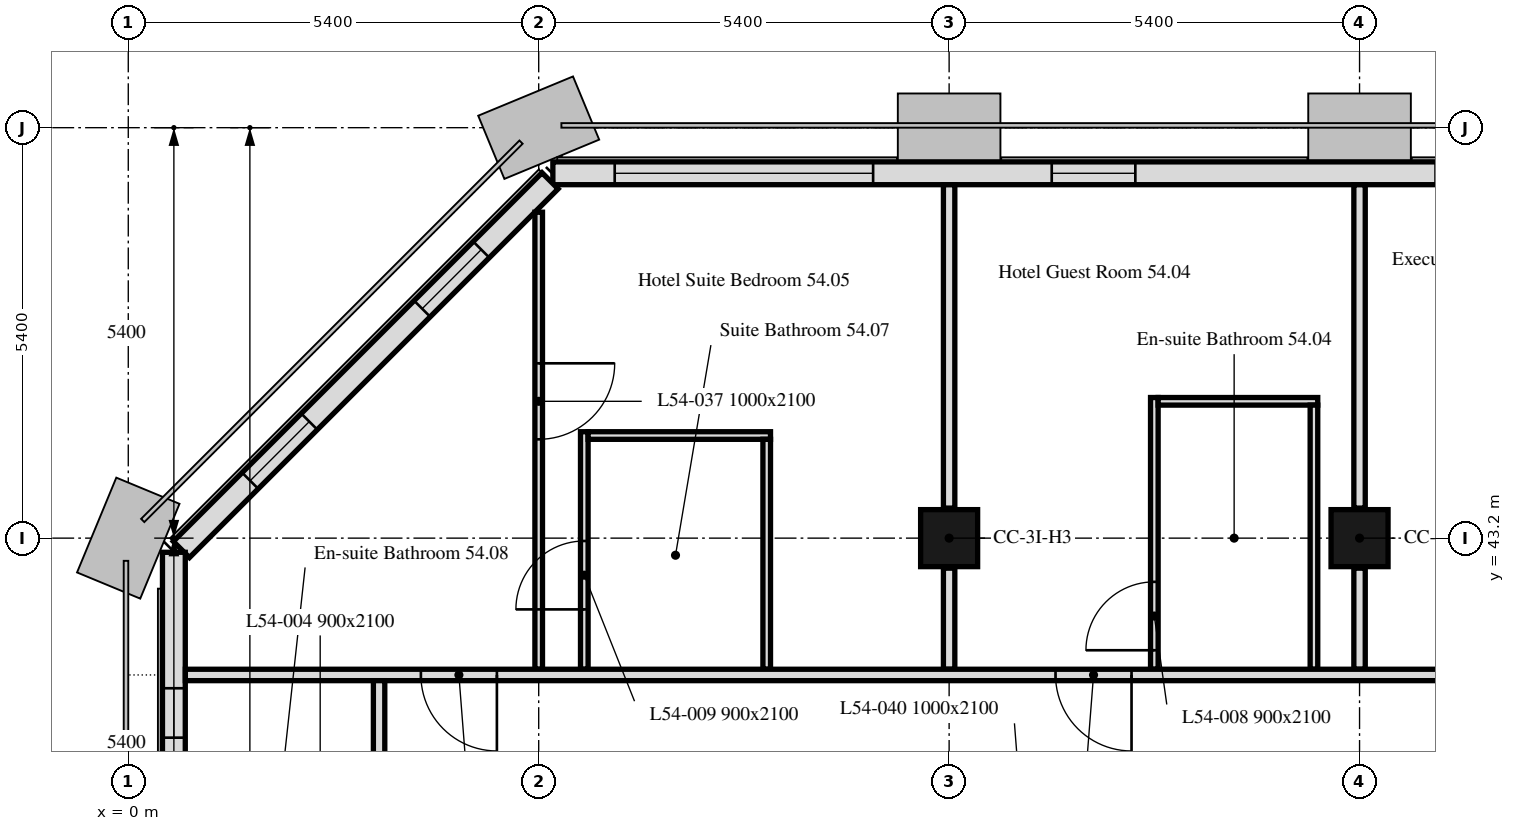
"""IFC4 building model, lengths in metres.
Left out: names, types, materials, properties, quantities, classifications, styles, units other than length and angle.
Written with IfcOpenShell. Run it as: python <this file> out.ifc"""

import sys

from ifc_helpers import new_model, si_unit, direction, frame, frame_2d, origin, origin_2d, place, context, subcontext, project, spatial, rectangle, extrude, element, fill, save


model = new_model("IFC4")
c1 = context("Model", 3, precision=1e-05, world=origin(), true_north=direction((0.0, 1.0)))
c2 = subcontext(c1, "Body", "Model", "MODEL_VIEW")
j1 = project(units=[si_unit("LENGTHUNIT", "METRE"), si_unit("PLANEANGLEUNIT", "RADIAN")], contexts=[c1])
p1 = place(None, origin())
s1 = spatial("IfcSite", under=j1, at=p1, CompositionType="ELEMENT")
p2 = place(p1, origin())
s2 = spatial("IfcBuilding", under=s1, at=p2, CompositionType="ELEMENT")
p3 = place(p2, frame((0.0, 0.0, 217.0)))
s3 = spatial("IfcBuildingStorey", under=s2, at=p3, CompositionType="ELEMENT", Elevation=217.0)
for number, where, z_axis, x_axis in (
    (1, (10.8, 43.2, 0.0), (0.0, 0.0, 1.0), (1.0, 0.0, 0.0)),
    (2, (16.2, 43.2, 0.0), (0.0, 0.0, 1.0), (1.0, 0.0, 0.0)),
):
    element("IfcColumn", number, at=place(p3, frame(where, z_axis=z_axis, x_axis=x_axis)), inside=s3, PredefinedType="COLUMN", context=c2, shape_type="SweptSolid", body=[
        extrude(rectangle(XDim=0.75, YDim=0.75, at=origin_2d()), origin(), (0.0, 0.0, 1.0), 3.0),
    ])
p4 = place(p3, frame((37.614, 48.0, 0.0), z_axis=(0.0, 0.0, 1.0), x_axis=(-1.0, 0.0, 0.0)))
e3 = element("IfcWall", 3, at=p4, inside=s3, PredefinedType="SOLIDWALL", context=c2, shape_type="SweptSolid", body=[
    extrude(rectangle(XDim=32.027, YDim=0.3, at=frame_2d((16.014, 0.0))), origin(), (0.0, 0.0, 1.0), 3.0),
])
p5 = place(p4, frame((2.764, 0.0, 0.9)))
e4 = element("IfcOpeningElement", 4, at=p5, cuts=e3, PredefinedType="OPENING", context=c2, shape_type="SweptSolid", body=[
    extrude(rectangle(XDim=1.1, YDim=1.7, at=frame_2d((0.55, 0.85))), frame((0.0, 0.16, 0.0), z_axis=(0.0, -1.0, 0.0), x_axis=(1.0, 0.0, 0.0)), (0.0, 0.0, 1.0), 0.32),
])
p6 = place(p4, frame((6.214, 0.0, 0.9)))
e5 = element("IfcOpeningElement", 5, at=p6, cuts=e3, PredefinedType="OPENING", context=c2, shape_type="SweptSolid", body=[
    extrude(rectangle(XDim=3.4, YDim=1.7, at=frame_2d((1.7, 0.85))), frame((0.0, 0.16, 0.0), z_axis=(0.0, -1.0, 0.0), x_axis=(1.0, 0.0, 0.0)), (0.0, 0.0, 1.0), 0.32),
])
p7 = place(p4, frame((13.564, 0.0, 0.9)))
e6 = element("IfcOpeningElement", 6, at=p7, cuts=e3, PredefinedType="OPENING", context=c2, shape_type="SweptSolid", body=[
    extrude(rectangle(XDim=1.1, YDim=1.7, at=frame_2d((0.55, 0.85))), frame((0.0, 0.16, 0.0), z_axis=(0.0, -1.0, 0.0), x_axis=(1.0, 0.0, 0.0)), (0.0, 0.0, 1.0), 0.32),
])
p8 = place(p4, frame((17.014, 0.0, 0.9)))
e7 = element("IfcOpeningElement", 7, at=p8, cuts=e3, PredefinedType="OPENING", context=c2, shape_type="SweptSolid", body=[
    extrude(rectangle(XDim=3.4, YDim=1.7, at=frame_2d((1.7, 0.85))), frame((0.0, 0.16, 0.0), z_axis=(0.0, -1.0, 0.0), x_axis=(1.0, 0.0, 0.0)), (0.0, 0.0, 1.0), 0.32),
])
p9 = place(p4, frame((24.364, 0.0, 0.9)))
e8 = element("IfcOpeningElement", 8, at=p9, cuts=e3, PredefinedType="OPENING", context=c2, shape_type="SweptSolid", body=[
    extrude(rectangle(XDim=1.1, YDim=1.7, at=frame_2d((0.55, 0.85))), frame((0.0, 0.16, 0.0), z_axis=(0.0, -1.0, 0.0), x_axis=(1.0, 0.0, 0.0)), (0.0, 0.0, 1.0), 0.32),
])
p10 = place(p4, frame((27.814, 0.0, 0.9)))
e9 = element("IfcOpeningElement", 9, at=p10, cuts=e3, PredefinedType="OPENING", context=c2, shape_type="SweptSolid", body=[
    extrude(rectangle(XDim=3.4, YDim=1.7, at=frame_2d((1.7, 0.85))), frame((0.0, 0.16, 0.0), z_axis=(0.0, -1.0, 0.0), x_axis=(1.0, 0.0, 0.0)), (0.0, 0.0, 1.0), 0.32),
])
p11 = place(p3, frame((5.55, 47.901, 0.0), z_axis=(0.0, 0.0, 1.0), x_axis=(-0.707106781187, -0.707106781187, 0.0)))
e10 = element("IfcWall", 10, at=p11, inside=s3, PredefinedType="SOLIDWALL", context=c2, shape_type="SweptSolid", body=[
    extrude(rectangle(XDim=6.86, YDim=0.3, at=frame_2d((3.43, 0.0))), origin(), (0.0, 0.0, 1.0), 3.0),
])
p12 = place(p11, frame((1.28, 0.0, 0.9)))
e11 = element("IfcOpeningElement", 11, at=p12, cuts=e10, PredefinedType="OPENING", context=c2, shape_type="SweptSolid", body=[
    extrude(rectangle(XDim=1.1, YDim=1.7, at=frame_2d((0.55, 0.85))), frame((0.0, 0.16, 0.0), z_axis=(0.0, -1.0, 0.0), x_axis=(1.0, 0.0, 0.0)), (0.0, 0.0, 1.0), 0.32),
])
p13 = place(p11, frame((4.48, 0.0, 0.9)))
e12 = element("IfcOpeningElement", 12, at=p13, cuts=e10, PredefinedType="OPENING", context=c2, shape_type="SweptSolid", body=[
    extrude(rectangle(XDim=1.1, YDim=1.7, at=frame_2d((0.55, 0.85))), frame((0.0, 0.16, 0.0), z_axis=(0.0, -1.0, 0.0), x_axis=(1.0, 0.0, 0.0)), (0.0, 0.0, 1.0), 0.32),
])
p14 = place(p3, frame((0.6, 43.014, 0.0), z_axis=(0.0, 0.0, 1.0), x_axis=(0.0, -1.0, 0.0)))
e13 = element("IfcWall", 13, at=p14, inside=s3, PredefinedType="SOLIDWALL", context=c2, shape_type="SweptSolid", body=[
    extrude(rectangle(XDim=32.027, YDim=0.3, at=frame_2d((16.014, 0.0))), origin(), (0.0, 0.0, 1.0), 3.0),
])
p15 = place(p14, frame((1.789, 0.0, 0.9)))
e14 = element("IfcOpeningElement", 14, at=p15, cuts=e13, PredefinedType="OPENING", context=c2, shape_type="SweptSolid", body=[
    extrude(rectangle(XDim=0.65, YDim=1.7, at=frame_2d((0.325, 0.85))), frame((0.0, 0.16, 0.0), z_axis=(0.0, -1.0, 0.0), x_axis=(1.0, 0.0, 0.0)), (0.0, 0.0, 1.0), 0.32),
])
p16 = place(p14, frame((2.764, 0.0, 0.9)))
e15 = element("IfcOpeningElement", 15, at=p16, cuts=e13, PredefinedType="OPENING", context=c2, shape_type="SweptSolid", body=[
    extrude(rectangle(XDim=1.1, YDim=1.7, at=frame_2d((0.55, 0.85))), frame((0.0, 0.16, 0.0), z_axis=(0.0, -1.0, 0.0), x_axis=(1.0, 0.0, 0.0)), (0.0, 0.0, 1.0), 0.32),
])
p17 = place(p14, frame((6.214, 0.0, 0.9)))
e16 = element("IfcOpeningElement", 16, at=p17, cuts=e13, PredefinedType="OPENING", context=c2, shape_type="SweptSolid", body=[
    extrude(rectangle(XDim=3.4, YDim=1.7, at=frame_2d((1.7, 0.85))), frame((0.0, 0.16, 0.0), z_axis=(0.0, -1.0, 0.0), x_axis=(1.0, 0.0, 0.0)), (0.0, 0.0, 1.0), 0.32),
])
p18 = place(p14, frame((11.964, 0.0, 0.9)))
e17 = element("IfcOpeningElement", 17, at=p18, cuts=e13, PredefinedType="OPENING", context=c2, shape_type="SweptSolid", body=[
    extrude(rectangle(XDim=1.1, YDim=1.7, at=frame_2d((0.55, 0.85))), frame((0.0, 0.16, 0.0), z_axis=(0.0, -1.0, 0.0), x_axis=(1.0, 0.0, 0.0)), (0.0, 0.0, 1.0), 0.32),
])
p19 = place(p14, frame((13.564, 0.0, 0.9)))
e18 = element("IfcOpeningElement", 18, at=p19, cuts=e13, PredefinedType="OPENING", context=c2, shape_type="SweptSolid", body=[
    extrude(rectangle(XDim=1.1, YDim=1.7, at=frame_2d((0.55, 0.85))), frame((0.0, 0.16, 0.0), z_axis=(0.0, -1.0, 0.0), x_axis=(1.0, 0.0, 0.0)), (0.0, 0.0, 1.0), 0.32),
])
p20 = place(p14, frame((17.364, 0.0, 0.9)))
e19 = element("IfcOpeningElement", 19, at=p20, cuts=e13, PredefinedType="OPENING", context=c2, shape_type="SweptSolid", body=[
    extrude(rectangle(XDim=1.1, YDim=1.7, at=frame_2d((0.55, 0.85))), frame((0.0, 0.16, 0.0), z_axis=(0.0, -1.0, 0.0), x_axis=(1.0, 0.0, 0.0)), (0.0, 0.0, 1.0), 0.32),
])
p21 = place(p14, frame((18.964, 0.0, 0.9)))
e20 = element("IfcOpeningElement", 20, at=p21, cuts=e13, PredefinedType="OPENING", context=c2, shape_type="SweptSolid", body=[
    extrude(rectangle(XDim=1.1, YDim=1.7, at=frame_2d((0.55, 0.85))), frame((0.0, 0.16, 0.0), z_axis=(0.0, -1.0, 0.0), x_axis=(1.0, 0.0, 0.0)), (0.0, 0.0, 1.0), 0.32),
])
p22 = place(p14, frame((22.764, 0.0, 0.9)))
e21 = element("IfcOpeningElement", 21, at=p22, cuts=e13, PredefinedType="OPENING", context=c2, shape_type="SweptSolid", body=[
    extrude(rectangle(XDim=1.1, YDim=1.7, at=frame_2d((0.55, 0.85))), frame((0.0, 0.16, 0.0), z_axis=(0.0, -1.0, 0.0), x_axis=(1.0, 0.0, 0.0)), (0.0, 0.0, 1.0), 0.32),
])
p23 = place(p14, frame((24.364, 0.0, 0.9)))
e22 = element("IfcOpeningElement", 22, at=p23, cuts=e13, PredefinedType="OPENING", context=c2, shape_type="SweptSolid", body=[
    extrude(rectangle(XDim=1.1, YDim=1.7, at=frame_2d((0.55, 0.85))), frame((0.0, 0.16, 0.0), z_axis=(0.0, -1.0, 0.0), x_axis=(1.0, 0.0, 0.0)), (0.0, 0.0, 1.0), 0.32),
])
p24 = place(p14, frame((27.814, 0.0, 0.9)))
e23 = element("IfcOpeningElement", 23, at=p24, cuts=e13, PredefinedType="OPENING", context=c2, shape_type="SweptSolid", body=[
    extrude(rectangle(XDim=3.4, YDim=1.7, at=frame_2d((1.7, 0.85))), frame((0.0, 0.16, 0.0), z_axis=(0.0, -1.0, 0.0), x_axis=(1.0, 0.0, 0.0)), (0.0, 0.0, 1.0), 0.32),
])
p25 = place(p3, frame((16.2, 47.849, 0.0), z_axis=(0.0, 0.0, 1.0), x_axis=(0.0, -1.0, 0.0)))
e24 = element("IfcWall", 24, at=p25, inside=s3, PredefinedType="PARTITIONING", context=c2, shape_type="SweptSolid", body=[
    extrude(rectangle(XDim=4.254, YDim=0.15, at=frame_2d((2.127, 0.0))), origin(), (0.0, 0.0, 1.0), 2.4),
])
p26 = place(p3, frame((16.2, 42.805, 0.0), z_axis=(0.0, 0.0, 1.0), x_axis=(0.0, -1.0, 0.0)))
e25 = element("IfcWall", 25, at=p26, inside=s3, PredefinedType="PARTITIONING", context=c2, shape_type="SweptSolid", body=[
    extrude(rectangle(XDim=1.33, YDim=0.15, at=frame_2d((0.665, 0.0))), origin(), (0.0, 0.0, 1.0), 2.4),
])
p27 = place(p3, frame((10.8, 47.849, 0.0), z_axis=(0.0, 0.0, 1.0), x_axis=(0.0, -1.0, 0.0)))
e26 = element("IfcWall", 26, at=p27, inside=s3, PredefinedType="PARTITIONING", context=c2, shape_type="SweptSolid", body=[
    extrude(rectangle(XDim=4.254, YDim=0.15, at=frame_2d((2.127, 0.0))), origin(), (0.0, 0.0, 1.0), 2.4),
])
p28 = place(p3, frame((10.8, 42.805, 0.0), z_axis=(0.0, 0.0, 1.0), x_axis=(0.0, -1.0, 0.0)))
e27 = element("IfcWall", 27, at=p28, inside=s3, PredefinedType="PARTITIONING", context=c2, shape_type="SweptSolid", body=[
    extrude(rectangle(XDim=1.33, YDim=0.15, at=frame_2d((0.665, 0.0))), origin(), (0.0, 0.0, 1.0), 2.4),
])
p29 = place(p3, frame((13.5, 41.475, 0.0), z_axis=(0.0, 0.0, 1.0), x_axis=(0.0, 1.0, 0.0)))
e28 = element("IfcWall", 28, at=p29, inside=s3, PredefinedType="PARTITIONING", context=c2, shape_type="SweptSolid", body=[
    extrude(rectangle(XDim=3.575, YDim=0.1, at=frame_2d((1.788, 0.0))), origin(), (0.0, 0.0, 1.0), 3.0),
])
p30 = place(p29, frame((0.25, 0.0, 0.0)))
e29 = element("IfcOpeningElement", 29, at=p30, cuts=e28, PredefinedType="OPENING", context=c2, shape_type="SweptSolid", body=[
    extrude(rectangle(XDim=0.9, YDim=2.1, at=frame_2d((0.45, 1.05))), frame((0.0, 0.05, 0.0), z_axis=(0.0, -1.0, 0.0), x_axis=(1.0, 0.0, 0.0)), (0.0, 0.0, 1.0), 0.1),
])
p31 = place(p3, frame((13.55, 45.0, 0.0), z_axis=(0.0, 0.0, 1.0), x_axis=(1.0, 0.0, 0.0)))
e30 = element("IfcWall", 30, at=p31, inside=s3, PredefinedType="PARTITIONING", context=c2, shape_type="SweptSolid", body=[
    extrude(rectangle(XDim=2.1, YDim=0.1, at=frame_2d((1.05, 0.0))), origin(), (0.0, 0.0, 1.0), 3.0),
])
p32 = place(p3, frame((15.6, 44.95, 0.0), z_axis=(0.0, 0.0, 1.0), x_axis=(0.0, -1.0, 0.0)))
e31 = element("IfcWall", 31, at=p32, inside=s3, PredefinedType="PARTITIONING", context=c2, shape_type="SweptSolid", body=[
    extrude(rectangle(XDim=3.475, YDim=0.1, at=frame_2d((1.737, 0.0))), origin(), (0.0, 0.0, 1.0), 3.0),
])
p33 = place(p3, frame((5.4, 47.488, 0.0), z_axis=(0.0, 0.0, 1.0), x_axis=(0.0, -1.0, 0.0)))
e32 = element("IfcWall", 32, at=p33, inside=s3, PredefinedType="PARTITIONING", context=c2, shape_type="SweptSolid", body=[
    extrude(rectangle(XDim=6.013, YDim=0.1, at=frame_2d((3.006, 0.0))), origin(), (0.0, 0.0, 1.0), 3.0),
])
p34 = place(p33, frame((1.988, 0.0, 0.0)))
e33 = element("IfcOpeningElement", 33, at=p34, cuts=e32, PredefinedType="OPENING", context=c2, shape_type="SweptSolid", body=[
    extrude(rectangle(XDim=1.0, YDim=2.1, at=frame_2d((0.5, 1.05))), frame((0.0, 0.05, 0.0), z_axis=(0.0, -1.0, 0.0), x_axis=(1.0, 0.0, 0.0)), (0.0, 0.0, 1.0), 0.1),
])
p35 = place(p3, frame((6.0, 41.475, 0.0), z_axis=(0.0, 0.0, 1.0), x_axis=(0.0, 1.0, 0.0)))
e34 = element("IfcWall", 34, at=p35, inside=s3, PredefinedType="PARTITIONING", context=c2, shape_type="SweptSolid", body=[
    extrude(rectangle(XDim=3.125, YDim=0.1, at=frame_2d((1.562, 0.0))), origin(), (0.0, 0.0, 1.0), 3.0),
])
p36 = place(p35, frame((0.788, 0.0, 0.0)))
e35 = element("IfcOpeningElement", 35, at=p36, cuts=e34, PredefinedType="OPENING", context=c2, shape_type="SweptSolid", body=[
    extrude(rectangle(XDim=0.9, YDim=2.1, at=frame_2d((0.45, 1.05))), frame((0.0, 0.05, 0.0), z_axis=(0.0, -1.0, 0.0), x_axis=(1.0, 0.0, 0.0)), (0.0, 0.0, 1.0), 0.1),
])
p37 = place(p3, frame((6.05, 44.55, 0.0), z_axis=(0.0, 0.0, 1.0), x_axis=(1.0, 0.0, 0.0)))
e36 = element("IfcWall", 36, at=p37, inside=s3, PredefinedType="PARTITIONING", context=c2, shape_type="SweptSolid", body=[
    extrude(rectangle(XDim=2.4, YDim=0.1, at=frame_2d((1.2, 0.0))), origin(), (0.0, 0.0, 1.0), 3.0),
])
p38 = place(p3, frame((8.4, 44.5, 0.0), z_axis=(0.0, 0.0, 1.0), x_axis=(0.0, -1.0, 0.0)))
e37 = element("IfcWall", 37, at=p38, inside=s3, PredefinedType="PARTITIONING", context=c2, shape_type="SweptSolid", body=[
    extrude(rectangle(XDim=3.025, YDim=0.1, at=frame_2d((1.512, 0.0))), origin(), (0.0, 0.0, 1.0), 3.0),
])
p39 = place(p3, frame((42.449, 41.4, 0.0), z_axis=(0.0, 0.0, 1.0), x_axis=(-1.0, 0.0, 0.0)))
e38 = element("IfcWall", 38, at=p39, inside=s3, PredefinedType="PARTITIONING", context=c2, shape_type="SweptSolid", body=[
    extrude(rectangle(XDim=41.698, YDim=0.15, at=frame_2d((20.849, 0.0))), origin(), (0.0, 0.0, 1.0), 2.4),
])
p40 = place(p39, frame((1.449, 0.0, 0.0)))
e39 = element("IfcOpeningElement", 39, at=p40, cuts=e38, PredefinedType="OPENING", context=c2, shape_type="SweptSolid", body=[
    extrude(rectangle(XDim=1.0, YDim=2.1, at=frame_2d((0.5, 1.05))), frame((0.0, 0.075, 0.0), z_axis=(0.0, -1.0, 0.0), x_axis=(1.0, 0.0, 0.0)), (0.0, 0.0, 1.0), 0.15),
])
p41 = place(p39, frame((29.249, 0.0, 0.0)))
e40 = element("IfcOpeningElement", 40, at=p41, cuts=e38, PredefinedType="OPENING", context=c2, shape_type="SweptSolid", body=[
    extrude(rectangle(XDim=1.0, YDim=2.1, at=frame_2d((0.5, 1.05))), frame((0.0, 0.075, 0.0), z_axis=(0.0, -1.0, 0.0), x_axis=(1.0, 0.0, 0.0)), (0.0, 0.0, 1.0), 0.15),
])
p42 = place(p39, frame((37.599, 0.0, 0.0)))
e41 = element("IfcOpeningElement", 41, at=p42, cuts=e38, PredefinedType="OPENING", context=c2, shape_type="SweptSolid", body=[
    extrude(rectangle(XDim=1.0, YDim=2.1, at=frame_2d((0.5, 1.05))), frame((0.0, 0.075, 0.0), z_axis=(0.0, -1.0, 0.0), x_axis=(1.0, 0.0, 0.0)), (0.0, 0.0, 1.0), 0.15),
])
p43 = place(p39, frame((17.649, 0.0, 0.0)))
e42 = element("IfcOpeningElement", 42, at=p43, cuts=e38, PredefinedType="OPENING", context=c2, shape_type="SweptSolid", body=[
    extrude(rectangle(XDim=1.0, YDim=2.1, at=frame_2d((0.5, 1.05))), frame((0.0, 0.075, 0.0), z_axis=(0.0, -1.0, 0.0), x_axis=(1.0, 0.0, 0.0)), (0.0, 0.0, 1.0), 0.15),
])
p44 = place(p3, frame((3.3, 11.325, 0.0), z_axis=(0.0, 0.0, 1.0), x_axis=(0.0, 1.0, 0.0)))
e43 = element("IfcWall", 43, at=p44, inside=s3, PredefinedType="PARTITIONING", context=c2, shape_type="SweptSolid", body=[
    extrude(rectangle(XDim=30.0, YDim=0.15, at=frame_2d((15.0, 0.0))), origin(), (0.0, 0.0, 1.0), 2.4),
])
p45 = place(p44, frame((17.875, 0.0, 0.0)))
e44 = element("IfcOpeningElement", 44, at=p45, cuts=e43, PredefinedType="OPENING", context=c2, shape_type="SweptSolid", body=[
    extrude(rectangle(XDim=1.0, YDim=2.1, at=frame_2d((0.5, 1.05))), frame((0.0, 0.075, 0.0), z_axis=(0.0, -1.0, 0.0), x_axis=(1.0, 0.0, 0.0)), (0.0, 0.0, 1.0), 0.15),
])
p46 = place(p44, frame((1.9, 0.0, 0.0)))
e45 = element("IfcOpeningElement", 45, at=p46, cuts=e43, PredefinedType="OPENING", context=c2, shape_type="SweptSolid", body=[
    extrude(rectangle(XDim=1.0, YDim=2.1, at=frame_2d((0.5, 1.05))), frame((0.0, 0.075, 0.0), z_axis=(0.0, -1.0, 0.0), x_axis=(1.0, 0.0, 0.0)), (0.0, 0.0, 1.0), 0.15),
])
p47 = place(p44, frame((23.725, 0.0, 0.0)))
e46 = element("IfcOpeningElement", 46, at=p47, cuts=e43, PredefinedType="OPENING", context=c2, shape_type="SweptSolid", body=[
    extrude(rectangle(XDim=1.0, YDim=2.1, at=frame_2d((0.5, 1.05))), frame((0.0, 0.075, 0.0), z_axis=(0.0, -1.0, 0.0), x_axis=(1.0, 0.0, 0.0)), (0.0, 0.0, 1.0), 0.15),
])
p48 = place(p44, frame((8.425, 0.0, 0.0)))
e47 = element("IfcOpeningElement", 47, at=p48, cuts=e43, PredefinedType="OPENING", context=c2, shape_type="SweptSolid", body=[
    extrude(rectangle(XDim=1.0, YDim=2.1, at=frame_2d((0.5, 1.05))), frame((0.0, 0.075, 0.0), z_axis=(0.0, -1.0, 0.0), x_axis=(1.0, 0.0, 0.0)), (0.0, 0.0, 1.0), 0.15),
])
p49 = place(p9, origin())
e48 = element("IfcWindow", 48, at=p49, inside=s3, PartitioningType="SINGLE_PANEL", PredefinedType="WINDOW", context=c2, shape_type="SweptSolid", body=[
    extrude(rectangle(XDim=1.1, YDim=1.7, at=frame_2d((0.55, 0.85))), frame((0.0, 0.03, 0.0), z_axis=(0.0, -1.0, 0.0), x_axis=(1.0, 0.0, 0.0)), (0.0, 0.0, 1.0), 0.06),
])
fill(e8, e48)
p50 = place(p10, origin())
e49 = element("IfcWindow", 49, at=p50, inside=s3, PartitioningType="SINGLE_PANEL", PredefinedType="WINDOW", context=c2, shape_type="SweptSolid", body=[
    extrude(rectangle(XDim=3.4, YDim=1.7, at=frame_2d((1.7, 0.85))), frame((0.0, 0.03, 0.0), z_axis=(0.0, -1.0, 0.0), x_axis=(1.0, 0.0, 0.0)), (0.0, 0.0, 1.0), 0.06),
])
fill(e9, e49)
p51 = place(p12, origin())
e50 = element("IfcWindow", 50, at=p51, inside=s3, PartitioningType="SINGLE_PANEL", PredefinedType="WINDOW", context=c2, shape_type="SweptSolid", body=[
    extrude(rectangle(XDim=1.1, YDim=1.7, at=frame_2d((0.55, 0.85))), frame((0.0, 0.03, 0.0), z_axis=(0.0, -1.0, 0.0), x_axis=(1.0, 0.0, 0.0)), (0.0, 0.0, 1.0), 0.06),
])
fill(e11, e50)
p52 = place(p13, origin())
e51 = element("IfcWindow", 51, at=p52, inside=s3, PartitioningType="SINGLE_PANEL", PredefinedType="WINDOW", context=c2, shape_type="SweptSolid", body=[
    extrude(rectangle(XDim=1.1, YDim=1.7, at=frame_2d((0.55, 0.85))), frame((0.0, 0.03, 0.0), z_axis=(0.0, -1.0, 0.0), x_axis=(1.0, 0.0, 0.0)), (0.0, 0.0, 1.0), 0.06),
])
fill(e12, e51)
p53 = place(p15, origin())
e52 = element("IfcWindow", 52, at=p53, inside=s3, PartitioningType="SINGLE_PANEL", PredefinedType="WINDOW", context=c2, shape_type="SweptSolid", body=[
    extrude(rectangle(XDim=0.65, YDim=1.7, at=frame_2d((0.325, 0.85))), frame((0.0, 0.03, 0.0), z_axis=(0.0, -1.0, 0.0), x_axis=(1.0, 0.0, 0.0)), (0.0, 0.0, 1.0), 0.06),
])
fill(e14, e52)
p54 = place(p30, origin())
e53 = element("IfcDoor", 53, at=p54, inside=s3, OperationType="SINGLE_SWING_LEFT", PredefinedType="DOOR", context=c2, shape_type="SweptSolid", body=[
    extrude(rectangle(XDim=0.9, YDim=2.1, at=frame_2d((0.45, 1.05))), frame((0.0, 0.025, 0.0), z_axis=(0.0, -1.0, 0.0), x_axis=(1.0, 0.0, 0.0)), (0.0, 0.0, 1.0), 0.05),
])
fill(e29, e53)
p55 = place(p36, origin())
e54 = element("IfcDoor", 54, at=p55, inside=s3, OperationType="SINGLE_SWING_LEFT", PredefinedType="DOOR", context=c2, shape_type="SweptSolid", body=[
    extrude(rectangle(XDim=0.9, YDim=2.1, at=frame_2d((0.45, 1.05))), frame((0.0, 0.025, 0.0), z_axis=(0.0, -1.0, 0.0), x_axis=(1.0, 0.0, 0.0)), (0.0, 0.0, 1.0), 0.05),
])
fill(e35, e54)
p56 = place(p41, origin())
e55 = element("IfcDoor", 55, at=p56, inside=s3, OperationType="SINGLE_SWING_LEFT", PredefinedType="DOOR", context=c2, shape_type="SweptSolid", body=[
    extrude(rectangle(XDim=1.0, YDim=2.1, at=frame_2d((0.5, 1.05))), frame((0.0, 0.025, 0.0), z_axis=(0.0, -1.0, 0.0), x_axis=(1.0, 0.0, 0.0)), (0.0, 0.0, 1.0), 0.05),
])
fill(e40, e55)
p57 = place(p34, origin())
e56 = element("IfcDoor", 56, at=p57, inside=s3, OperationType="SINGLE_SWING_LEFT", PredefinedType="DOOR", context=c2, shape_type="SweptSolid", body=[
    extrude(rectangle(XDim=1.0, YDim=2.1, at=frame_2d((0.5, 1.05))), frame((0.0, 0.025, 0.0), z_axis=(0.0, -1.0, 0.0), x_axis=(1.0, 0.0, 0.0)), (0.0, 0.0, 1.0), 0.05),
])
fill(e33, e56)
p58 = place(p42, origin())
e57 = element("IfcDoor", 57, at=p58, inside=s3, OperationType="SINGLE_SWING_LEFT", PredefinedType="DOOR", context=c2, shape_type="SweptSolid", body=[
    extrude(rectangle(XDim=1.0, YDim=2.1, at=frame_2d((0.5, 1.05))), frame((0.0, 0.025, 0.0), z_axis=(0.0, -1.0, 0.0), x_axis=(1.0, 0.0, 0.0)), (0.0, 0.0, 1.0), 0.05),
])
fill(e41, e57)
save(model, sys.argv[1])
